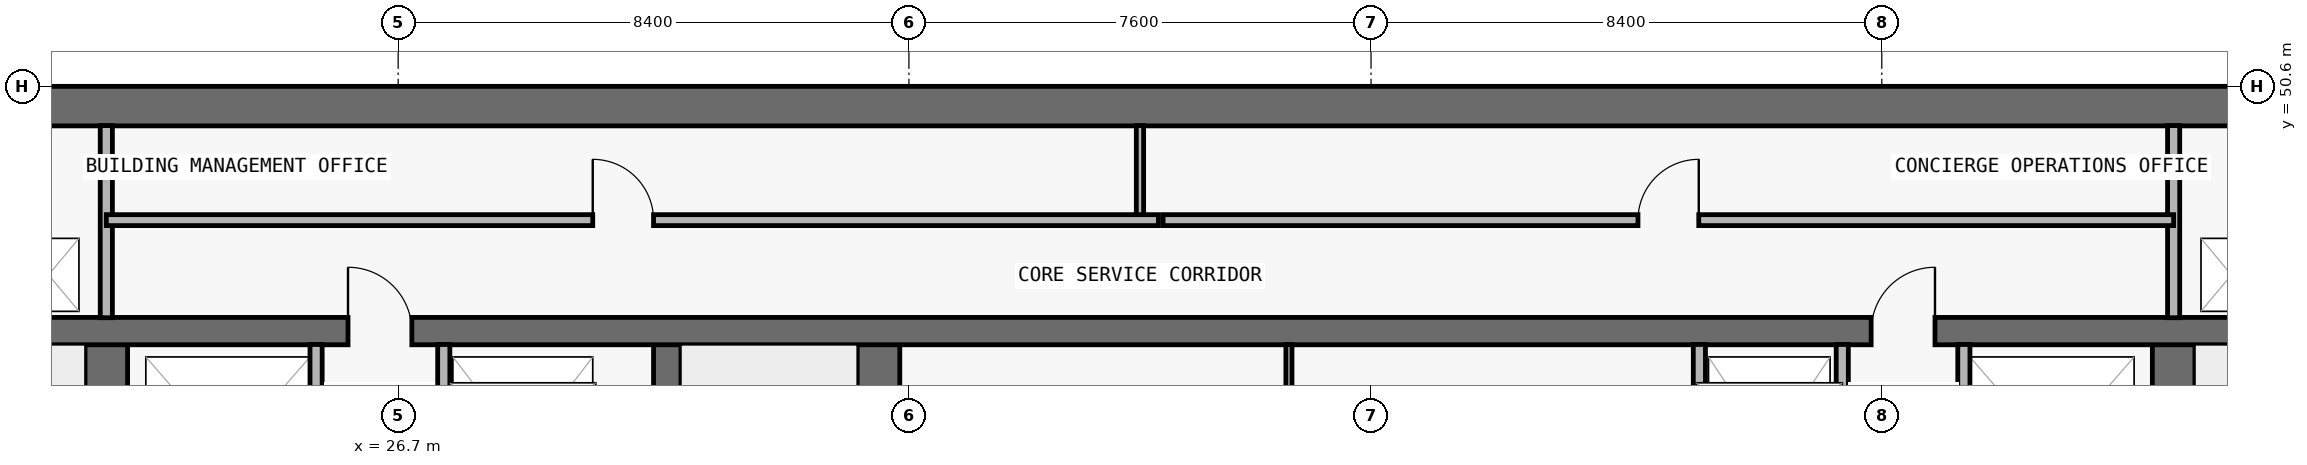
"""IFC4 building model, lengths in metres.
Left out: names, types, materials, properties, quantities, classifications, styles, units other than length and angle.
Written with IfcOpenShell. Run it as: python <this file> out.ifc"""

import sys

from ifc_helpers import new_model, si_unit, direction, frame, frame_2d, origin, place, context, subcontext, project, spatial, rectangle, extrude, element, fill, save


model = new_model("IFC4")
c1 = context("Model", 3, precision=1e-05, world=origin(), true_north=direction((0.0, 1.0)))
c2 = subcontext(c1, "Body", "Model", "MODEL_VIEW")
j1 = project(units=[si_unit("LENGTHUNIT", "METRE"), si_unit("PLANEANGLEUNIT", "RADIAN")], contexts=[c1])
p1 = place(None, origin())
s1 = spatial("IfcSite", under=j1, at=p1, CompositionType="ELEMENT")
p2 = place(p1, origin())
s2 = spatial("IfcBuilding", under=s1, at=p2, CompositionType="ELEMENT")
p3 = place(p2, frame((0.0, 0.0, 214.8)))
s3 = spatial("IfcBuildingStorey", under=s2, at=p3, CompositionType="ELEMENT", Elevation=214.8)
p4 = place(p3, frame((17.95, 50.275, 0.0), z_axis=(0.0, 0.0, 1.0), x_axis=(1.0, 0.0, 0.0)))
e1 = element("IfcWall", 1, at=p4, inside=s3, PredefinedType="SHEAR", context=c2, shape_type="SweptSolid", body=[
    extrude(rectangle(XDim=41.9, YDim=0.65, at=frame_2d((20.95, 0.0))), origin(), (0.0, 0.0, 1.0), 3.05),
])
p5 = place(p3, frame((21.9, 37.0, 0.0), z_axis=(0.0, 0.0, 1.0), x_axis=(0.0, 1.0, 0.0)))
e2 = element("IfcWall", 2, at=p5, inside=s3, PredefinedType="SHEAR", context=c2, shape_type="SweptSolid", body=[
    extrude(rectangle(XDim=9.575, YDim=0.7, at=frame_2d((4.788, 0.0))), origin(), (0.0, 0.0, 1.0), 3.05),
])
p6 = place(p5, frame((0.55, 0.0, 0.0)))
e3 = element("IfcOpeningElement", 3, at=p6, cuts=e2, PredefinedType="OPENING", context=c2, shape_type="SweptSolid", body=[
    extrude(rectangle(XDim=1.1, YDim=2.15, at=frame_2d((0.55, 1.075))), frame((0.0, 0.36, 0.0), z_axis=(0.0, -1.0, 0.0), x_axis=(1.0, 0.0, 0.0)), (0.0, 0.0, 1.0), 0.72),
])
p7 = place(p3, frame((55.9, 37.0, 0.0), z_axis=(0.0, 0.0, 1.0), x_axis=(0.0, 1.0, 0.0)))
e4 = element("IfcWall", 4, at=p7, inside=s3, PredefinedType="SHEAR", context=c2, shape_type="SweptSolid", body=[
    extrude(rectangle(XDim=9.575, YDim=0.7, at=frame_2d((4.788, 0.0))), origin(), (0.0, 0.0, 1.0), 3.05),
])
p8 = place(p7, frame((0.55, 0.0, 0.0)))
e5 = element("IfcOpeningElement", 5, at=p8, cuts=e4, PredefinedType="OPENING", context=c2, shape_type="SweptSolid", body=[
    extrude(rectangle(XDim=1.1, YDim=2.15, at=frame_2d((0.55, 1.075))), frame((0.0, 0.36, 0.0), z_axis=(0.0, -1.0, 0.0), x_axis=(1.0, 0.0, 0.0)), (0.0, 0.0, 1.0), 0.72),
])
p9 = place(p3, frame((31.125, 37.0, 0.0), z_axis=(0.0, 0.0, 1.0), x_axis=(0.0, 1.0, 0.0)))
e6 = element("IfcWall", 6, at=p9, inside=s3, PredefinedType="SHEAR", context=c2, shape_type="SweptSolid", body=[
    extrude(rectangle(XDim=9.575, YDim=0.45, at=frame_2d((4.788, 0.0))), origin(), (0.0, 0.0, 1.0), 3.05),
])
p10 = place(p3, frame((34.6, 37.0, 0.0), z_axis=(0.0, 0.0, 1.0), x_axis=(0.0, 1.0, 0.0)))
e7 = element("IfcWall", 7, at=p10, inside=s3, PredefinedType="SHEAR", context=c2, shape_type="SweptSolid", body=[
    extrude(rectangle(XDim=9.575, YDim=0.7, at=frame_2d((4.788, 0.0))), origin(), (0.0, 0.0, 1.0), 3.05),
])
p11 = place(p3, frame((18.3, 46.575, 0.0), z_axis=(0.0, 0.0, 1.0), x_axis=(1.0, 0.0, 0.0)))
e8 = element("IfcWall", 8, at=p11, inside=s3, PredefinedType="SHEAR", context=c2, shape_type="SweptSolid", body=[
    extrude(rectangle(XDim=41.2, YDim=0.45, at=frame_2d((20.6, 0.0))), origin(), (0.0, 0.0, 1.0), 3.05),
])
p12 = place(p11, frame((7.575, 0.0, 0.0)))
e9 = element("IfcOpeningElement", 9, at=p12, cuts=e8, PredefinedType="OPENING", context=c2, shape_type="SweptSolid", body=[
    extrude(rectangle(XDim=1.05, YDim=2.15, at=frame_2d((0.525, 1.075))), frame((0.0, 0.235, 0.0), z_axis=(0.0, -1.0, 0.0), x_axis=(1.0, 0.0, 0.0)), (0.0, 0.0, 1.0), 0.47),
])
p13 = place(p11, frame((32.625, 0.0, 0.0)))
e10 = element("IfcOpeningElement", 10, at=p13, cuts=e8, PredefinedType="OPENING", context=c2, shape_type="SweptSolid", body=[
    extrude(rectangle(XDim=1.05, YDim=2.15, at=frame_2d((0.525, 1.075))), frame((0.0, 0.235, 0.0), z_axis=(0.0, -1.0, 0.0), x_axis=(1.0, 0.0, 0.0)), (0.0, 0.0, 1.0), 0.47),
])
p14 = place(p3, frame((21.9, 46.795, 0.0), z_axis=(0.0, 0.0, 1.0), x_axis=(0.0, 1.0, 0.0)))
e11 = element("IfcWall", 11, at=p14, inside=s3, PredefinedType="PARTITIONING", context=c2, shape_type="SweptSolid", body=[
    extrude(rectangle(XDim=3.16, YDim=0.2, at=frame_2d((1.58, 0.0))), origin(), (0.0, 0.0, 1.0), 3.05),
])
for number, where, z_axis, x_axis in (
    (12, (25.35, 43.17, 0.0), (0.0, 0.0, 1.0), (0.0, 1.0, 0.0)),
    (13, (27.45, 43.17, 0.0), (0.0, 0.0, 1.0), (0.0, 1.0, 0.0)),
):
    element("IfcWall", number, at=place(p3, frame(where, z_axis=z_axis, x_axis=x_axis)), inside=s3, PredefinedType="PARTITIONING", context=c2, shape_type="SweptSolid", body=[
        extrude(rectangle(XDim=3.185, YDim=0.2, at=frame_2d((1.593, 0.0))), origin(), (0.0, 0.0, 1.0), 3.05),
    ])
p15 = place(p3, frame((38.9, 48.4, 0.0), z_axis=(0.0, 0.0, 1.0), x_axis=(0.0, 1.0, 0.0)))
e14 = element("IfcWall", 14, at=p15, inside=s3, PredefinedType="PARTITIONING", context=c2, shape_type="SweptSolid", body=[
    extrude(rectangle(XDim=1.555, YDim=0.12, at=frame_2d((0.778, 0.0))), origin(), (0.0, 0.0, 1.0), 3.05),
])
p16 = place(p3, frame((41.35, 43.17, 0.0), z_axis=(0.0, 0.0, 1.0), x_axis=(0.0, 1.0, 0.0)))
e15 = element("IfcWall", 15, at=p16, inside=s3, PredefinedType="MOVABLE", context=c2, shape_type="SweptSolid", body=[
    extrude(rectangle(XDim=3.185, YDim=0.1, at=frame_2d((1.593, 0.0))), origin(), (0.0, 0.0, 1.0), 3.05),
])
for number, where, z_axis, x_axis in (
    (16, (48.1, 43.17, 0.0), (0.0, 0.0, 1.0), (0.0, 1.0, 0.0)),
    (17, (50.45, 43.17, 0.0), (0.0, 0.0, 1.0), (0.0, 1.0, 0.0)),
    (18, (52.45, 43.17, 0.0), (0.0, 0.0, 1.0), (0.0, 1.0, 0.0)),
):
    element("IfcWall", number, at=place(p3, frame(where, z_axis=z_axis, x_axis=x_axis)), inside=s3, PredefinedType="PARTITIONING", context=c2, shape_type="SweptSolid", body=[
        extrude(rectangle(XDim=3.185, YDim=0.2, at=frame_2d((1.593, 0.0))), origin(), (0.0, 0.0, 1.0), 3.05),
    ])
p17 = place(p3, frame((55.9, 46.795, 0.0), z_axis=(0.0, 0.0, 1.0), x_axis=(0.0, 1.0, 0.0)))
e19 = element("IfcWall", 19, at=p17, inside=s3, PredefinedType="PARTITIONING", context=c2, shape_type="SweptSolid", body=[
    extrude(rectangle(XDim=3.16, YDim=0.2, at=frame_2d((1.58, 0.0))), origin(), (0.0, 0.0, 1.0), 3.05),
])
p18 = place(p3, frame((21.9, 48.4, 0.0), z_axis=(0.0, 0.0, 1.0), x_axis=(1.0, 0.0, 0.0)))
e20 = element("IfcWall", 20, at=p18, inside=s3, PredefinedType="PARTITIONING", context=c2, shape_type="SweptSolid", body=[
    extrude(rectangle(XDim=17.304, YDim=0.18, at=frame_2d((8.652, 0.0))), origin(), (0.0, 0.0, 1.0), 3.05),
])
p19 = place(p18, frame((8.0, 0.0, 0.0)))
e21 = element("IfcOpeningElement", 21, at=p19, cuts=e20, PredefinedType="OPENING", context=c2, shape_type="SweptSolid", body=[
    extrude(rectangle(XDim=1.0, YDim=2.2, at=frame_2d((0.5, 1.1))), frame((0.0, 0.1, 0.0), z_axis=(0.0, -1.0, 0.0), x_axis=(1.0, 0.0, 0.0)), (0.0, 0.0, 1.0), 0.2),
])
p20 = place(p3, frame((39.28, 48.4, 0.0), z_axis=(0.0, 0.0, 1.0), x_axis=(1.0, 0.0, 0.0)))
e22 = element("IfcWall", 22, at=p20, inside=s3, PredefinedType="PARTITIONING", context=c2, shape_type="SweptSolid", body=[
    extrude(rectangle(XDim=16.62, YDim=0.18, at=frame_2d((8.31, 0.0))), origin(), (0.0, 0.0, 1.0), 3.05),
])
p21 = place(p20, frame((7.81, 0.0, 0.0)))
e23 = element("IfcOpeningElement", 23, at=p21, cuts=e22, PredefinedType="OPENING", context=c2, shape_type="SweptSolid", body=[
    extrude(rectangle(XDim=1.0, YDim=2.2, at=frame_2d((0.5, 1.1))), frame((0.0, 0.1, 0.0), z_axis=(0.0, -1.0, 0.0), x_axis=(1.0, 0.0, 0.0)), (0.0, 0.0, 1.0), 0.2),
])
p22 = place(p12, origin())
e24 = element("IfcDoor", 24, at=p22, inside=s3, OperationType="SINGLE_SWING_LEFT", PredefinedType="DOOR", context=c2, shape_type="SweptSolid", body=[
    extrude(rectangle(XDim=1.05, YDim=2.15, at=frame_2d((0.525, 1.075))), frame((0.0, 0.025, 0.0), z_axis=(0.0, -1.0, 0.0), x_axis=(1.0, 0.0, 0.0)), (0.0, 0.0, 1.0), 0.05),
])
fill(e9, e24)
p23 = place(p13, origin())
e25 = element("IfcDoor", 25, at=p23, inside=s3, OperationType="SINGLE_SWING_RIGHT", PredefinedType="DOOR", context=c2, shape_type="SweptSolid", body=[
    extrude(rectangle(XDim=1.05, YDim=2.15, at=frame_2d((0.525, 1.075))), frame((0.0, 0.025, 0.0), z_axis=(0.0, -1.0, 0.0), x_axis=(1.0, 0.0, 0.0)), (0.0, 0.0, 1.0), 0.05),
])
fill(e10, e25)
p24 = place(p19, origin())
e26 = element("IfcDoor", 26, at=p24, inside=s3, OperationType="SINGLE_SWING_LEFT", PredefinedType="DOOR", context=c2, shape_type="SweptSolid", body=[
    extrude(rectangle(XDim=1.0, YDim=2.2, at=frame_2d((0.5, 1.1))), frame((0.0, 0.025, 0.0), z_axis=(0.0, -1.0, 0.0), x_axis=(1.0, 0.0, 0.0)), (0.0, 0.0, 1.0), 0.05),
])
fill(e21, e26)
p25 = place(p21, origin())
e27 = element("IfcDoor", 27, at=p25, inside=s3, OperationType="SINGLE_SWING_RIGHT", PredefinedType="DOOR", context=c2, shape_type="SweptSolid", body=[
    extrude(rectangle(XDim=1.0, YDim=2.2, at=frame_2d((0.5, 1.1))), frame((0.0, 0.025, 0.0), z_axis=(0.0, -1.0, 0.0), x_axis=(1.0, 0.0, 0.0)), (0.0, 0.0, 1.0), 0.05),
])
fill(e23, e27)
save(model, sys.argv[1])
